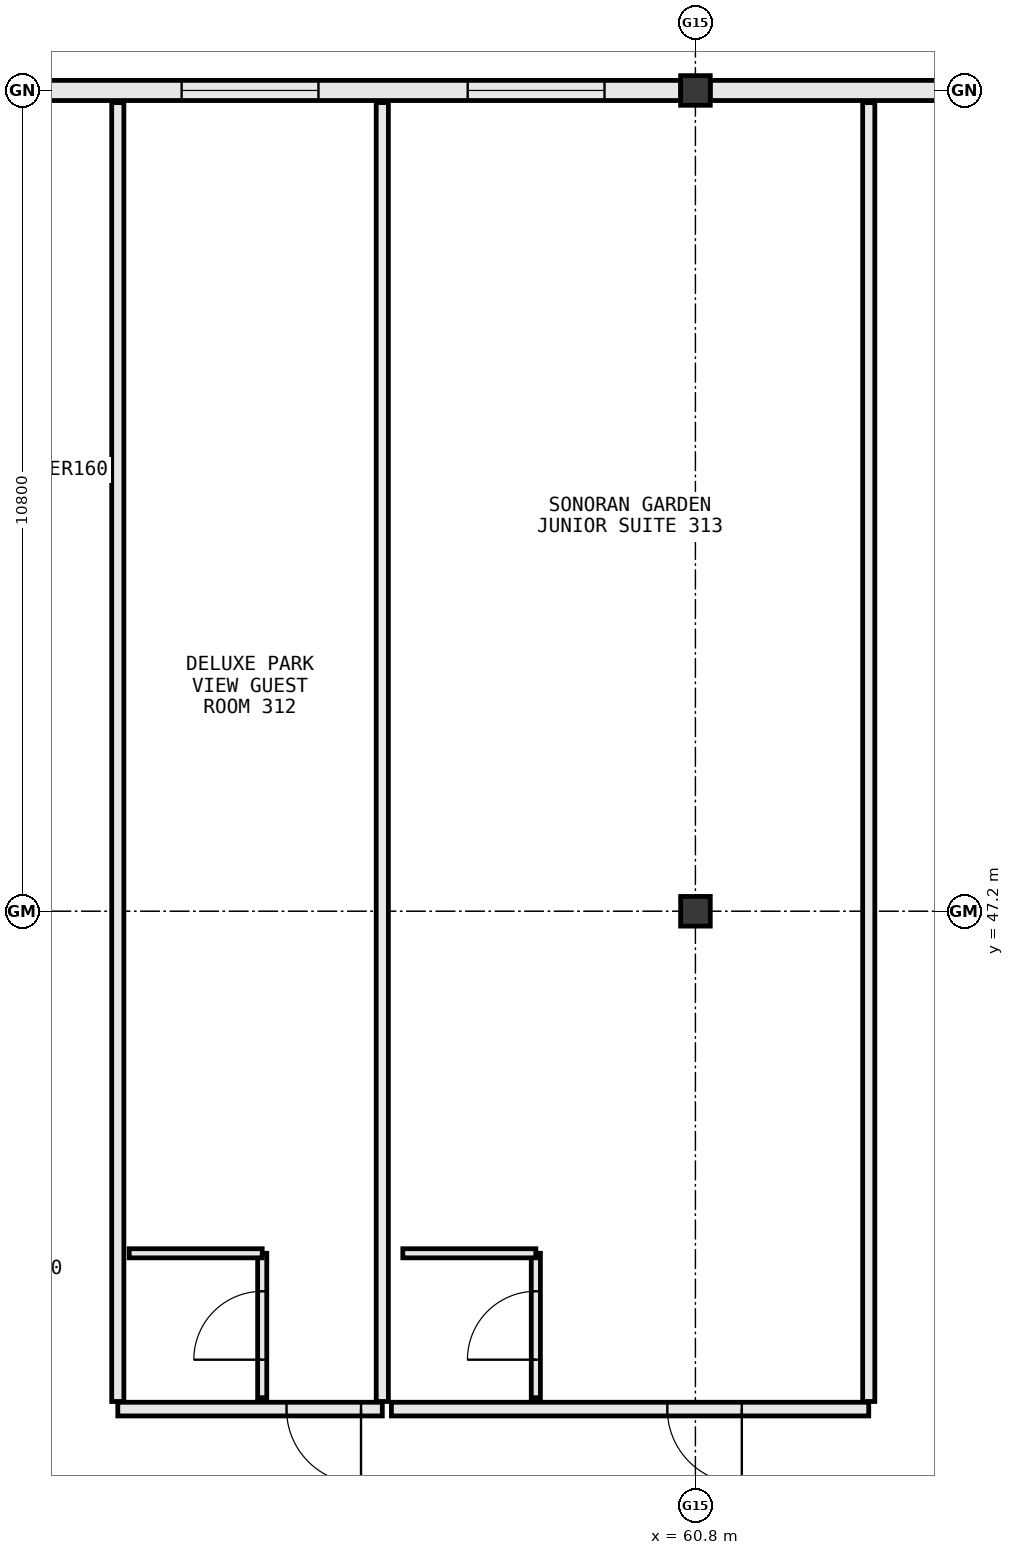
"""IFC4 building model, lengths in metres.
Left out: names, types, materials, properties, quantities, classifications, styles, units other than length and angle.
Written with IfcOpenShell. Run it as: python <this file> out.ifc"""

import sys

from ifc_helpers import new_model, si_unit, direction, frame, frame_2d, origin, origin_2d, place, context, subcontext, project, spatial, rectangle, extrude, element, fill, save


model = new_model("IFC4")
c1 = context("Model", 3, precision=1e-05, world=origin(), true_north=direction((0.0, 1.0)))
c2 = subcontext(c1, "Body", "Model", "MODEL_VIEW")
j1 = project(units=[si_unit("LENGTHUNIT", "METRE"), si_unit("PLANEANGLEUNIT", "RADIAN")], contexts=[c1])
p1 = place(None, origin())
s1 = spatial("IfcSite", under=j1, at=p1, CompositionType="ELEMENT")
p2 = place(p1, origin())
s2 = spatial("IfcBuilding", under=s1, at=p2, CompositionType="ELEMENT")
p3 = place(p2, frame((0.0, 0.0, 46.6)))
s3 = spatial("IfcBuildingStorey", under=s2, at=p3, CompositionType="ELEMENT", Elevation=46.6)
for number, where, z_axis, x_axis in (
    (1, (60.8, 47.2, 0.0), (0.0, 0.0, 1.0), (1.0, 0.0, 0.0)),
    (2, (60.8, 58.0, 0.0), (0.0, 0.0, 1.0), (1.0, 0.0, 0.0)),
):
    element("IfcColumn", number, at=place(p3, frame(where, z_axis=z_axis, x_axis=x_axis)), inside=s3, PredefinedType="COLUMN", context=c2, shape_type="SweptSolid", body=[
        extrude(rectangle(XDim=0.39, YDim=0.39, at=origin_2d()), origin(), (0.0, 0.0, 1.0), 4.2),
    ])
p4 = place(p3, frame((65.377, 58.0, 0.0), z_axis=(0.0, 0.0, 1.0), x_axis=(-1.0, 0.0, 0.0)))
e3 = element("IfcWall", 3, at=p4, inside=s3, PredefinedType="STANDARD", context=c2, shape_type="SweptSolid", body=[
    extrude(rectangle(XDim=4.384, YDim=0.265, at=frame_2d((2.192, 0.0))), origin(), (0.0, 0.0, 1.0), 3.99),
])
p5 = place(p3, frame((60.607, 58.0, 0.0), z_axis=(0.0, 0.0, 1.0), x_axis=(-1.0, 0.0, 0.0)))
e4 = element("IfcWall", 4, at=p5, inside=s3, PredefinedType="STANDARD", context=c2, shape_type="SweptSolid", body=[
    extrude(rectangle(XDim=9.184, YDim=0.265, at=frame_2d((4.592, 0.0))), origin(), (0.0, 0.0, 1.0), 3.99),
])
p6 = place(p5, frame((4.767, 0.0, 0.85)))
e5 = element("IfcOpeningElement", 5, at=p6, cuts=e4, PredefinedType="OPENING", context=c2, shape_type="SweptSolid", body=[
    extrude(rectangle(XDim=1.8, YDim=1.85, at=frame_2d((0.9, 0.925))), frame((0.0, 0.145, 0.0), z_axis=(0.0, -1.0, 0.0), x_axis=(1.0, 0.0, 0.0)), (0.0, 0.0, 1.0), 0.289),
])
p7 = place(p5, frame((1.003, 0.0, 0.85)))
e6 = element("IfcOpeningElement", 6, at=p7, cuts=e4, PredefinedType="OPENING", context=c2, shape_type="SweptSolid", body=[
    extrude(rectangle(XDim=1.8, YDim=1.85, at=frame_2d((0.9, 0.925))), frame((0.0, 0.145, 0.0), z_axis=(0.0, -1.0, 0.0), x_axis=(1.0, 0.0, 0.0)), (0.0, 0.0, 1.0), 0.289),
])
p8 = place(p3, frame((53.2, 40.65, 0.0), z_axis=(0.0, 0.0, 1.0), x_axis=(1.0, 0.0, 0.0)))
e7 = element("IfcWall", 7, at=p8, inside=s3, PredefinedType="PARTITIONING", context=c2, shape_type="SweptSolid", body=[
    extrude(rectangle(XDim=3.48, YDim=0.18, at=frame_2d((1.74, 0.0))), origin(), (0.0, 0.0, 1.0), 3.99),
])
p9 = place(p8, frame((2.22, 0.0, 0.0)))
e8 = element("IfcOpeningElement", 8, at=p9, cuts=e7, PredefinedType="OPENING", context=c2, shape_type="SweptSolid", body=[
    extrude(rectangle(XDim=0.98, YDim=2.18, at=frame_2d((0.49, 1.09))), frame((0.0, 0.102, 0.0), z_axis=(0.0, -1.0, 0.0), x_axis=(1.0, 0.0, 0.0)), (0.0, 0.0, 1.0), 0.204),
])
for number, where, z_axis, x_axis in (
    (9, (53.2, 40.75, 0.0), (0.0, 0.0, 1.0), (0.0, 1.0, 0.0)),
    (10, (56.68, 40.75, 0.0), (0.0, 0.0, 1.0), (0.0, 1.0, 0.0)),
):
    element("IfcWall", number, at=place(p3, frame(where, z_axis=z_axis, x_axis=x_axis)), inside=s3, PredefinedType="PARTITIONING", context=c2, shape_type="SweptSolid", body=[
        extrude(rectangle(XDim=17.09, YDim=0.16, at=frame_2d((8.545, 0.0))), origin(), (0.0, 0.0, 1.0), 3.99),
    ])
p10 = place(p3, frame((55.1, 40.8, 0.0), z_axis=(0.0, 0.0, 1.0), x_axis=(0.0, 1.0, 0.0)))
e11 = element("IfcWall", 11, at=p10, inside=s3, PredefinedType="PARTITIONING", context=c2, shape_type="SweptSolid", body=[
    extrude(rectangle(XDim=1.9, YDim=0.12, at=frame_2d((0.95, 0.0))), origin(), (0.0, 0.0, 1.0), 3.99),
])
p11 = place(p10, frame((0.5, 0.0, 0.0)))
e12 = element("IfcOpeningElement", 12, at=p11, cuts=e11, PredefinedType="OPENING", context=c2, shape_type="SweptSolid", body=[
    extrude(rectangle(XDim=0.9, YDim=2.15, at=frame_2d((0.45, 1.075))), frame((0.0, 0.072, 0.0), z_axis=(0.0, -1.0, 0.0), x_axis=(1.0, 0.0, 0.0)), (0.0, 0.0, 1.0), 0.144),
])
p12 = place(p3, frame((53.35, 42.7, 0.0), z_axis=(0.0, 0.0, 1.0), x_axis=(1.0, 0.0, 0.0)))
e13 = element("IfcWall", 13, at=p12, inside=s3, PredefinedType="PARTITIONING", context=c2, shape_type="SweptSolid", body=[
    extrude(rectangle(XDim=1.75, YDim=0.12, at=frame_2d((0.875, 0.0))), origin(), (0.0, 0.0, 1.0), 3.99),
])
p13 = place(p3, frame((56.8, 40.65, 0.0), z_axis=(0.0, 0.0, 1.0), x_axis=(1.0, 0.0, 0.0)))
e14 = element("IfcWall", 14, at=p13, inside=s3, PredefinedType="PARTITIONING", context=c2, shape_type="SweptSolid", body=[
    extrude(rectangle(XDim=6.28, YDim=0.18, at=frame_2d((3.14, 0.0))), origin(), (0.0, 0.0, 1.0), 3.99),
])
p14 = place(p13, frame((3.63, 0.0, 0.0)))
e15 = element("IfcOpeningElement", 15, at=p14, cuts=e14, PredefinedType="OPENING", context=c2, shape_type="SweptSolid", body=[
    extrude(rectangle(XDim=0.98, YDim=2.18, at=frame_2d((0.49, 1.09))), frame((0.0, 0.102, 0.0), z_axis=(0.0, -1.0, 0.0), x_axis=(1.0, 0.0, 0.0)), (0.0, 0.0, 1.0), 0.204),
])
p15 = place(p3, frame((63.08, 40.75, 0.0), z_axis=(0.0, 0.0, 1.0), x_axis=(0.0, 1.0, 0.0)))
e16 = element("IfcWall", 16, at=p15, inside=s3, PredefinedType="PARTITIONING", context=c2, shape_type="SweptSolid", body=[
    extrude(rectangle(XDim=17.09, YDim=0.16, at=frame_2d((8.545, 0.0))), origin(), (0.0, 0.0, 1.0), 3.99),
])
p16 = place(p3, frame((58.7, 40.8, 0.0), z_axis=(0.0, 0.0, 1.0), x_axis=(0.0, 1.0, 0.0)))
e17 = element("IfcWall", 17, at=p16, inside=s3, PredefinedType="PARTITIONING", context=c2, shape_type="SweptSolid", body=[
    extrude(rectangle(XDim=1.9, YDim=0.12, at=frame_2d((0.95, 0.0))), origin(), (0.0, 0.0, 1.0), 3.99),
])
p17 = place(p16, frame((0.5, 0.0, 0.0)))
e18 = element("IfcOpeningElement", 18, at=p17, cuts=e17, PredefinedType="OPENING", context=c2, shape_type="SweptSolid", body=[
    extrude(rectangle(XDim=0.9, YDim=2.15, at=frame_2d((0.45, 1.075))), frame((0.0, 0.072, 0.0), z_axis=(0.0, -1.0, 0.0), x_axis=(1.0, 0.0, 0.0)), (0.0, 0.0, 1.0), 0.144),
])
p18 = place(p3, frame((56.95, 42.7, 0.0), z_axis=(0.0, 0.0, 1.0), x_axis=(1.0, 0.0, 0.0)))
e19 = element("IfcWall", 19, at=p18, inside=s3, PredefinedType="PARTITIONING", context=c2, shape_type="SweptSolid", body=[
    extrude(rectangle(XDim=1.75, YDim=0.12, at=frame_2d((0.875, 0.0))), origin(), (0.0, 0.0, 1.0), 3.99),
])
p19 = place(p6, origin())
e20 = element("IfcWindow", 20, at=p19, inside=s3, PartitioningType="SINGLE_PANEL", PredefinedType="WINDOW", context=c2, shape_type="SweptSolid", body=[
    extrude(rectangle(XDim=1.8, YDim=1.85, at=frame_2d((0.9, 0.925))), frame((0.0, 0.03, 0.0), z_axis=(0.0, -1.0, 0.0), x_axis=(1.0, 0.0, 0.0)), (0.0, 0.0, 1.0), 0.06),
])
fill(e5, e20)
p20 = place(p7, origin())
e21 = element("IfcWindow", 21, at=p20, inside=s3, PartitioningType="SINGLE_PANEL", PredefinedType="WINDOW", context=c2, shape_type="SweptSolid", body=[
    extrude(rectangle(XDim=1.8, YDim=1.85, at=frame_2d((0.9, 0.925))), frame((0.0, 0.03, 0.0), z_axis=(0.0, -1.0, 0.0), x_axis=(1.0, 0.0, 0.0)), (0.0, 0.0, 1.0), 0.06),
])
fill(e6, e21)
p21 = place(p9, frame((0.98, 0.0, 0.0), z_axis=(0.0, 0.0, 1.0), x_axis=(-1.0, 0.0, 0.0)))
e22 = element("IfcDoor", 22, at=p21, inside=s3, OperationType="SINGLE_SWING_RIGHT", PredefinedType="DOOR", context=c2, shape_type="SweptSolid", body=[
    extrude(rectangle(XDim=0.98, YDim=2.18, at=frame_2d((0.49, 1.09))), frame((0.0, 0.025, 0.0), z_axis=(0.0, -1.0, 0.0), x_axis=(1.0, 0.0, 0.0)), (0.0, 0.0, 1.0), 0.05),
])
fill(e8, e22)
p22 = place(p11, origin())
e23 = element("IfcDoor", 23, at=p22, inside=s3, OperationType="SINGLE_SWING_LEFT", PredefinedType="DOOR", context=c2, shape_type="SweptSolid", body=[
    extrude(rectangle(XDim=0.9, YDim=2.15, at=frame_2d((0.45, 1.075))), frame((0.0, 0.025, 0.0), z_axis=(0.0, -1.0, 0.0), x_axis=(1.0, 0.0, 0.0)), (0.0, 0.0, 1.0), 0.05),
])
fill(e12, e23)
p23 = place(p14, frame((0.98, 0.0, 0.0), z_axis=(0.0, 0.0, 1.0), x_axis=(-1.0, 0.0, 0.0)))
e24 = element("IfcDoor", 24, at=p23, inside=s3, OperationType="SINGLE_SWING_RIGHT", PredefinedType="DOOR", context=c2, shape_type="SweptSolid", body=[
    extrude(rectangle(XDim=0.98, YDim=2.18, at=frame_2d((0.49, 1.09))), frame((0.0, 0.025, 0.0), z_axis=(0.0, -1.0, 0.0), x_axis=(1.0, 0.0, 0.0)), (0.0, 0.0, 1.0), 0.05),
])
fill(e15, e24)
p24 = place(p17, origin())
e25 = element("IfcDoor", 25, at=p24, inside=s3, OperationType="SINGLE_SWING_LEFT", PredefinedType="DOOR", context=c2, shape_type="SweptSolid", body=[
    extrude(rectangle(XDim=0.9, YDim=2.15, at=frame_2d((0.45, 1.075))), frame((0.0, 0.025, 0.0), z_axis=(0.0, -1.0, 0.0), x_axis=(1.0, 0.0, 0.0)), (0.0, 0.0, 1.0), 0.05),
])
fill(e18, e25)
save(model, sys.argv[1])
